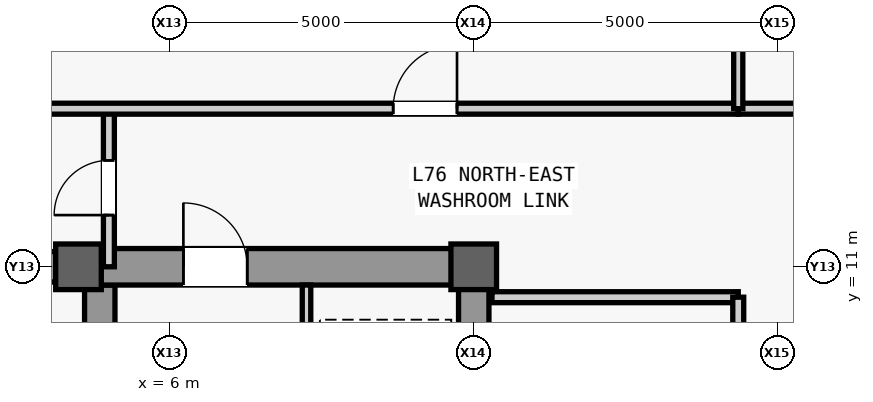
"""IFC4 building model, lengths in metres.
Left out: names, types, materials, properties, quantities, classifications, styles, units other than length and angle.
Written with IfcOpenShell. Run it as: python <this file> out.ifc"""

import sys

from ifc_helpers import new_model, si_unit, direction, frame, frame_2d, origin, origin_2d, place, context, subcontext, project, spatial, rectangle, extrude, source, transform, mapped, element, fill, save


model = new_model("IFC4")
c1 = context("Model", 3, precision=1e-05, world=origin(), true_north=direction((0.0, 1.0)))
c2 = subcontext(c1, "Body", "Model", "MODEL_VIEW")
j1 = project(units=[si_unit("LENGTHUNIT", "METRE"), si_unit("PLANEANGLEUNIT", "RADIAN")], contexts=[c1])
p1 = place(None, origin())
s1 = spatial("IfcSite", under=j1, at=p1, CompositionType="ELEMENT")
p2 = place(p1, origin())
s2 = spatial("IfcBuilding", under=s1, at=p2, CompositionType="ELEMENT")
p3 = place(p2, frame((0.0, 0.0, 321.5)))
s3 = spatial("IfcBuildingStorey", under=s2, at=p3, CompositionType="ELEMENT", Elevation=321.5)
m1 = source(origin(), c2, "Body", "SweptSolid", [
    extrude(rectangle(XDim=22.0, YDim=0.5, at=frame_2d((11.0, 0.0))), origin(), (0.0, 0.0, 1.0), 4.54),
])
p4 = place(p3, frame((11.0, -11.0, 0.0), z_axis=(0.0, 0.0, 1.0), x_axis=(0.0, 1.0, 0.0)))
e1 = element("IfcWall", 1, at=p4, inside=s3, PredefinedType="SHEAR", context=c2, shape_type="MappedRepresentation", body=[
    mapped(m1, transform((0.0, 0.0, 0.0), scale=1.0)),
])
m2 = source(origin(), c2, "Body", "SweptSolid", [
    extrude(rectangle(XDim=1.1, YDim=2.2, at=frame_2d((0.55, 1.1))), frame((0.0, 0.26, 0.0), z_axis=(0.0, -1.0, 0.0), x_axis=(1.0, 0.0, 0.0)), (0.0, 0.0, 1.0), 0.52),
])
p5 = place(p4, frame((0.8, 0.0, 0.0)))
e2 = element("IfcOpeningElement", 2, at=p5, cuts=e1, PredefinedType="OPENING", context=c2, shape_type="MappedRepresentation", body=[
    mapped(m2, transform((0.0, 0.0, 0.0), scale=1.0)),
])
m3 = source(origin(), c2, "Body", "SweptSolid", [
    extrude(rectangle(XDim=0.9, YDim=2.15, at=frame_2d((0.45, 1.075))), frame((0.0, 0.26, 0.0), z_axis=(0.0, -1.0, 0.0), x_axis=(1.0, 0.0, 0.0)), (0.0, 0.0, 1.0), 0.52),
])
p6 = place(p4, frame((6.2, 0.0, 0.0)))
e3 = element("IfcOpeningElement", 3, at=p6, cuts=e1, PredefinedType="OPENING", context=c2, shape_type="MappedRepresentation", body=[
    mapped(m3, transform((0.0, 0.0, 0.0), scale=1.0)),
])
p7 = place(p4, frame((8.525, 0.0, 0.0)))
e4 = element("IfcOpeningElement", 4, at=p7, cuts=e1, PredefinedType="OPENING", context=c2, shape_type="MappedRepresentation", body=[
    mapped(m3, transform((0.0, 0.0, 0.0), scale=1.0)),
])
m4 = source(origin(), c2, "Body", "SweptSolid", [
    extrude(rectangle(XDim=1.2, YDim=2.3, at=frame_2d((0.6, 1.15))), frame((0.0, 0.26, 0.0), z_axis=(0.0, -1.0, 0.0), x_axis=(1.0, 0.0, 0.0)), (0.0, 0.0, 1.0), 0.52),
])
p8 = place(p4, frame((17.6, 0.0, 0.0)))
e5 = element("IfcOpeningElement", 5, at=p8, cuts=e1, PredefinedType="OPENING", context=c2, shape_type="MappedRepresentation", body=[
    mapped(m4, transform((0.0, 0.0, 0.0), scale=1.0)),
])
p9 = place(p4, frame((19.6, 0.0, 0.0)))
e6 = element("IfcOpeningElement", 6, at=p9, cuts=e1, PredefinedType="OPENING", context=c2, shape_type="MappedRepresentation", body=[
    mapped(m4, transform((0.0, 0.0, 0.0), scale=1.0)),
])
m5 = source(origin(), c2, "Body", "SweptSolid", [
    extrude(rectangle(XDim=1.3, YDim=2.3, at=frame_2d((0.65, 1.15))), frame((0.0, 0.26, 0.0), z_axis=(0.0, -1.0, 0.0), x_axis=(1.0, 0.0, 0.0)), (0.0, 0.0, 1.0), 0.52),
])
p10 = place(p4, frame((2.7, 0.0, 0.0)))
e7 = element("IfcOpeningElement", 7, at=p10, cuts=e1, PredefinedType="OPENING", context=c2, shape_type="MappedRepresentation", body=[
    mapped(m5, transform((0.0, 0.0, 0.0), scale=1.0)),
])
p11 = place(p4, frame((13.35, 0.0, 0.0)))
e8 = element("IfcOpeningElement", 8, at=p11, cuts=e1, PredefinedType="OPENING", context=c2, shape_type="MappedRepresentation", body=[
    mapped(m5, transform((0.0, 0.0, 0.0), scale=1.0)),
])
m6 = source(origin(), c2, "Body", "SweptSolid", [
    extrude(rectangle(XDim=21.4, YDim=0.5, at=frame_2d((10.7, 0.0))), origin(), (0.0, 0.0, 1.0), 4.54),
])
p12 = place(p3, frame((4.85, -10.7, 0.0), z_axis=(0.0, 0.0, 1.0), x_axis=(0.0, 1.0, 0.0)))
e9 = element("IfcWall", 9, at=p12, inside=s3, PredefinedType="SHEAR", context=c2, shape_type="MappedRepresentation", body=[
    mapped(m6, transform((0.0, 0.0, 0.0), scale=1.0)),
])
m7 = source(origin(), c2, "Body", "SweptSolid", [
    extrude(rectangle(XDim=5.9, YDim=0.6, at=frame_2d((2.95, 0.0))), origin(), (0.0, 0.0, 1.0), 4.54),
])
p13 = place(p3, frame((4.85, 11.0, 0.0), z_axis=(0.0, 0.0, 1.0), x_axis=(1.0, 0.0, 0.0)))
e10 = element("IfcWall", 10, at=p13, inside=s3, PredefinedType="SHEAR", context=c2, shape_type="MappedRepresentation", body=[
    mapped(m7, transform((0.0, 0.0, 0.0), scale=1.0)),
])
m8 = source(origin(), c2, "Body", "SweptSolid", [
    extrude(rectangle(XDim=1.05, YDim=2.2, at=frame_2d((0.525, 1.1))), frame((0.0, 0.31, 0.0), z_axis=(0.0, -1.0, 0.0), x_axis=(1.0, 0.0, 0.0)), (0.0, 0.0, 1.0), 0.62),
])
p14 = place(p13, frame((1.375, 0.0, 0.0)))
e11 = element("IfcOpeningElement", 11, at=p14, cuts=e10, PredefinedType="OPENING", context=c2, shape_type="MappedRepresentation", body=[
    mapped(m8, transform((0.0, 0.0, 0.0), scale=1.0)),
])
m9 = source(origin(), c2, "Body", "SweptSolid", [
    extrude(rectangle(XDim=9.2, YDim=0.5, at=frame_2d((4.6, 0.0))), origin(), (0.0, 0.0, 1.0), 4.54),
])
p15 = place(p3, frame((-4.6, 11.0, 0.0), z_axis=(0.0, 0.0, 1.0), x_axis=(1.0, 0.0, 0.0)))
e12 = element("IfcWall", 12, at=p15, inside=s3, PredefinedType="SHEAR", context=c2, shape_type="MappedRepresentation", body=[
    mapped(m9, transform((0.0, 0.0, 0.0), scale=1.0)),
])
m10 = source(origin(), c2, "Body", "SweptSolid", [
    extrude(rectangle(XDim=0.75, YDim=0.75, at=origin_2d()), origin(), (0.0, 0.0, 1.0), 4.8),
])
for number, where, z_axis, x_axis in (
    (13, (4.5, 11.0, 0.0), (0.0, 0.0, 1.0), (1.0, 0.0, 0.0)),
    (14, (11.0, 11.0, 0.0), (0.0, 0.0, 1.0), (1.0, 0.0, 0.0)),
):
    element("IfcColumn", number, at=place(p3, frame(where, z_axis=z_axis, x_axis=x_axis)), inside=s3, PredefinedType="COLUMN", context=c2, shape_type="MappedRepresentation", body=[
        mapped(m10, transform((0.0, 0.0, 0.0), scale=1.0)),
    ])
m11 = source(origin(), c2, "Body", "SweptSolid", [
    extrude(rectangle(XDim=9.4, YDim=0.14, at=frame_2d((4.7, 0.0))), origin(), (0.0, 0.0, 1.0), 4.54),
])
p16 = place(p3, frame((8.25, 1.3, 0.0), z_axis=(0.0, 0.0, 1.0), x_axis=(0.0, 1.0, 0.0)))
e15 = element("IfcWall", 15, at=p16, inside=s3, PredefinedType="PARTITIONING", context=c2, shape_type="MappedRepresentation", body=[
    mapped(m11, transform((0.0, 0.0, 0.0), scale=1.0)),
])
m12 = source(origin(), c2, "Body", "SweptSolid", [
    extrude(rectangle(XDim=4.05, YDim=0.18, at=frame_2d((2.025, 0.0))), origin(), (0.0, 0.0, 1.0), 4.54),
])
p17 = place(p3, frame((11.3, 10.5, 0.0), z_axis=(0.0, 0.0, 1.0), x_axis=(1.0, 0.0, 0.0)))
e16 = element("IfcWall", 16, at=p17, inside=s3, PredefinedType="PARTITIONING", context=c2, shape_type="MappedRepresentation", body=[
    mapped(m12, transform((0.0, 0.0, 0.0), scale=1.0)),
])
m13 = source(origin(), c2, "Body", "SweptSolid", [
    extrude(rectangle(XDim=16.6, YDim=0.18, at=frame_2d((8.3, 0.0))), origin(), (0.0, 0.0, 1.0), 4.54),
])
p18 = place(p3, frame((15.35, -6.1, 0.0), z_axis=(0.0, 0.0, 1.0), x_axis=(0.0, 1.0, 0.0)))
e17 = element("IfcWall", 17, at=p18, inside=s3, PredefinedType="PARTITIONING", context=c2, shape_type="MappedRepresentation", body=[
    mapped(m13, transform((0.0, 0.0, 0.0), scale=1.0)),
])
m14 = source(origin(), c2, "Body", "SweptSolid", [
    extrude(rectangle(XDim=1.8, YDim=2.25, at=frame_2d((0.9, 1.125))), frame((0.0, 0.1, 0.0), z_axis=(0.0, -1.0, 0.0), x_axis=(1.0, 0.0, 0.0)), (0.0, 0.0, 1.0), 0.2),
])
p19 = place(p18, frame((2.7, 0.0, 0.0)))
e18 = element("IfcOpeningElement", 18, at=p19, cuts=e17, PredefinedType="OPENING", context=c2, shape_type="MappedRepresentation", body=[
    mapped(m14, transform((0.0, 0.0, 0.0), scale=1.0)),
])
p20 = place(p18, frame((13.0, 0.0, 0.0)))
e19 = element("IfcOpeningElement", 19, at=p20, cuts=e17, PredefinedType="OPENING", context=c2, shape_type="MappedRepresentation", body=[
    mapped(m14, transform((0.0, 0.0, 0.0), scale=1.0)),
])
m15 = source(origin(), c2, "Body", "SweptSolid", [
    extrude(rectangle(XDim=2.6, YDim=0.18, at=frame_2d((1.3, 0.0))), origin(), (0.0, 0.0, 1.0), 4.54),
])
p21 = place(p3, frame((5.0, 11.0, 0.0), z_axis=(0.0, 0.0, 1.0), x_axis=(0.0, 1.0, 0.0)))
e20 = element("IfcWall", 20, at=p21, inside=s3, PredefinedType="PARTITIONING", context=c2, shape_type="MappedRepresentation", body=[
    mapped(m15, transform((0.0, 0.0, 0.0), scale=1.0)),
])
m16 = source(origin(), c2, "Body", "SweptSolid", [
    extrude(rectangle(XDim=0.9, YDim=2.15, at=frame_2d((0.45, 1.075))), frame((0.0, 0.1, 0.0), z_axis=(0.0, -1.0, 0.0), x_axis=(1.0, 0.0, 0.0)), (0.0, 0.0, 1.0), 0.2),
])
p22 = place(p21, frame((0.85, 0.0, 0.0)))
e21 = element("IfcOpeningElement", 21, at=p22, cuts=e20, PredefinedType="OPENING", context=c2, shape_type="MappedRepresentation", body=[
    mapped(m16, transform((0.0, 0.0, 0.0), scale=1.0)),
])
m17 = source(origin(), c2, "Body", "SweptSolid", [
    extrude(rectangle(XDim=2.4, YDim=0.18, at=frame_2d((1.2, 0.0))), origin(), (0.0, 0.0, 1.0), 4.54),
])
p23 = place(p3, frame((15.35, 13.6, 0.0), z_axis=(0.0, 0.0, 1.0), x_axis=(1.0, 0.0, 0.0)))
e22 = element("IfcWall", 22, at=p23, inside=s3, PredefinedType="PARTITIONING", context=c2, shape_type="MappedRepresentation", body=[
    mapped(m17, transform((0.0, 0.0, 0.0), scale=1.0)),
])
m18 = source(origin(), c2, "Body", "SweptSolid", [
    extrude(rectangle(XDim=32.75, YDim=0.18, at=frame_2d((16.375, 0.0))), origin(), (0.0, 0.0, 1.0), 4.54),
])
p24 = place(p3, frame((-17.4, 13.6, 0.0), z_axis=(0.0, 0.0, 1.0), x_axis=(1.0, 0.0, 0.0)))
e23 = element("IfcWall", 23, at=p24, inside=s3, PredefinedType="PARTITIONING", context=c2, shape_type="MappedRepresentation", body=[
    mapped(m18, transform((0.0, 0.0, 0.0), scale=1.0)),
])
m19 = source(origin(), c2, "Body", "SweptSolid", [
    extrude(rectangle(XDim=1.05, YDim=2.2, at=frame_2d((0.525, 1.1))), frame((0.0, 0.1, 0.0), z_axis=(0.0, -1.0, 0.0), x_axis=(1.0, 0.0, 0.0)), (0.0, 0.0, 1.0), 0.2),
])
p25 = place(p24, frame((27.075, 0.0, 0.0)))
e24 = element("IfcOpeningElement", 24, at=p25, cuts=e23, PredefinedType="OPENING", context=c2, shape_type="MappedRepresentation", body=[
    mapped(m19, transform((0.0, 0.0, 0.0), scale=1.0)),
])
m20 = source(origin(), c2, "Body", "SweptSolid", [
    extrude(rectangle(XDim=14.4, YDim=0.15, at=frame_2d((7.2, 0.0))), origin(), (0.0, 0.0, 1.0), 4.54),
])
p26 = place(p3, frame((15.35, 13.6, 0.0), z_axis=(0.0, 0.0, 1.0), x_axis=(0.0, 1.0, 0.0)))
e25 = element("IfcWall", 25, at=p26, inside=s3, PredefinedType="PARTITIONING", context=c2, shape_type="MappedRepresentation", body=[
    mapped(m20, transform((0.0, 0.0, 0.0), scale=1.0)),
])
m21 = source(origin(), c2, "Body", "SweptSolid", [
    extrude(rectangle(XDim=1.05, YDim=2.2, at=frame_2d((0.525, 1.1))), frame((0.0, 0.025, 0.0), z_axis=(0.0, -1.0, 0.0), x_axis=(1.0, 0.0, 0.0)), (0.0, 0.0, 1.0), 0.05),
])
p27 = place(p14, origin())
e26 = element("IfcDoor", 26, at=p27, inside=s3, OperationType="SINGLE_SWING_LEFT", PredefinedType="DOOR", context=c2, shape_type="MappedRepresentation", body=[
    mapped(m21, transform((0.0, 0.0, 0.0), scale=1.0)),
])
fill(e11, e26)
m22 = source(origin(), c2, "Body", "SweptSolid", [
    extrude(rectangle(XDim=0.9, YDim=2.15, at=frame_2d((0.45, 1.075))), frame((0.0, 0.025, 0.0), z_axis=(0.0, -1.0, 0.0), x_axis=(1.0, 0.0, 0.0)), (0.0, 0.0, 1.0), 0.05),
])
p28 = place(p22, origin())
e27 = element("IfcDoor", 27, at=p28, inside=s3, OperationType="SINGLE_SWING_LEFT", PredefinedType="DOOR", context=c2, shape_type="MappedRepresentation", body=[
    mapped(m22, transform((0.0, 0.0, 0.0), scale=1.0)),
])
fill(e21, e27)
p29 = place(p25, origin())
e28 = element("IfcDoor", 28, at=p29, inside=s3, OperationType="SINGLE_SWING_RIGHT", PredefinedType="DOOR", context=c2, shape_type="MappedRepresentation", body=[
    mapped(m21, transform((0.0, 0.0, 0.0), scale=1.0)),
])
fill(e24, e28)
save(model, sys.argv[1])
